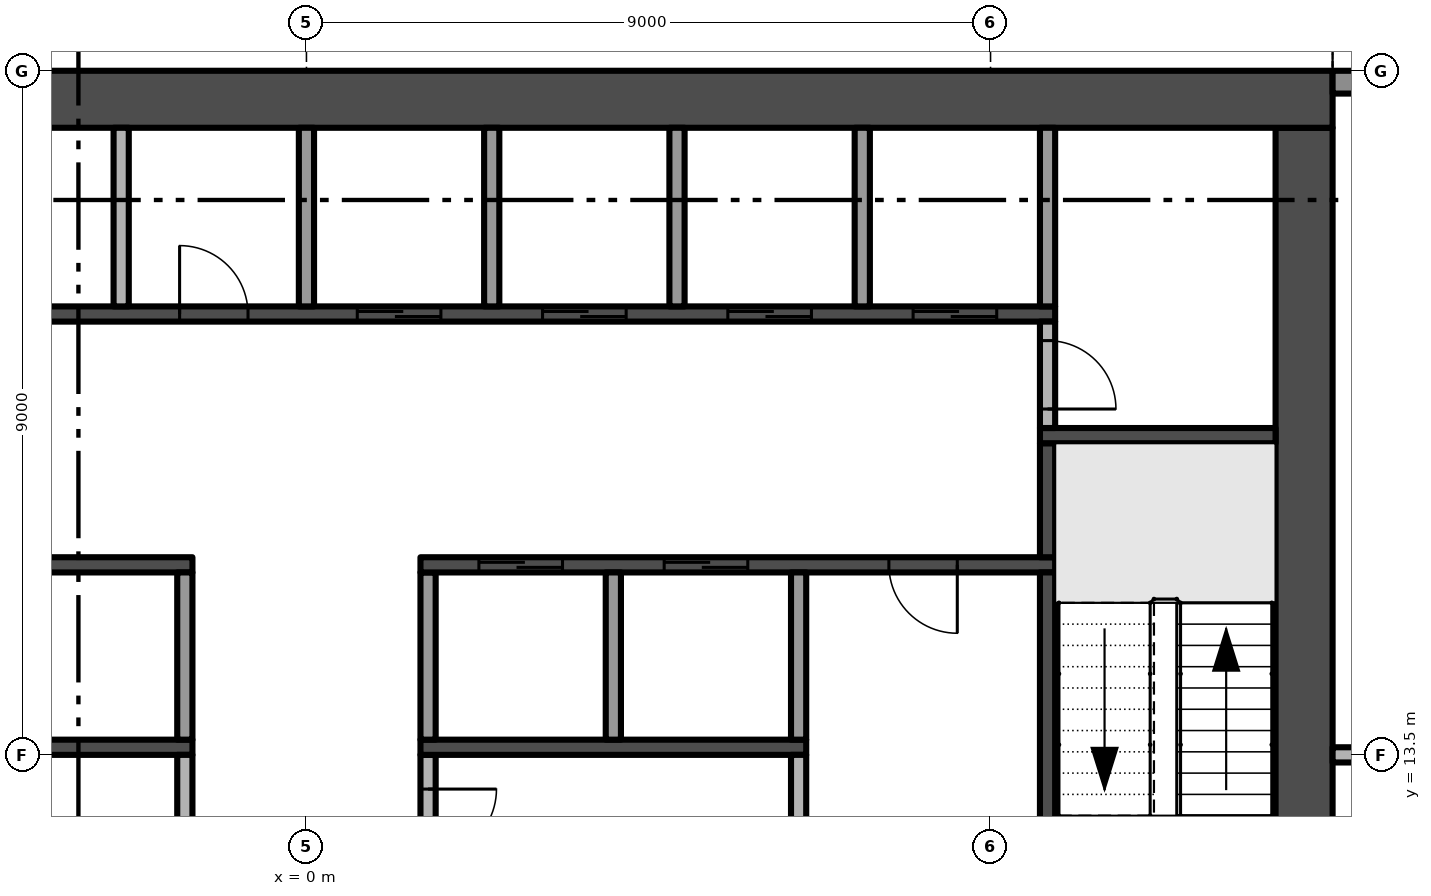
"""IFC4 building model, lengths in metres.
Left out: names, types, materials, properties, quantities, classifications, styles, units other than length and angle.
Written with IfcOpenShell. Run it as: python <this file> out.ifc"""

import sys

from ifc_helpers import new_model, si_unit, direction, frame, frame_2d, origin, place, context, subcontext, project, spatial, rectangle, extrude, element, fill, save


model = new_model("IFC4")
c1 = context("Model", 3, precision=1e-05, world=origin(), true_north=direction((0.0, 1.0)))
c2 = subcontext(c1, "Body", "Model", "MODEL_VIEW")
j1 = project(units=[si_unit("LENGTHUNIT", "METRE"), si_unit("PLANEANGLEUNIT", "RADIAN")], contexts=[c1])
p1 = place(None, origin())
s1 = spatial("IfcSite", under=j1, at=p1, CompositionType="ELEMENT")
p2 = place(p1, origin())
s2 = spatial("IfcBuilding", under=s1, at=p2, CompositionType="ELEMENT")
p3 = place(p2, frame((0.0, 0.0, 151.6)))
s3 = spatial("IfcBuildingStorey", under=s2, at=p3, CompositionType="ELEMENT", Elevation=151.6)
p4 = place(p3, frame((13.125, 5.25, -0.3), z_axis=(0.0, 0.0, 1.0), x_axis=(0.0, 1.0, 0.0)))
e1 = element("IfcWall", 1, at=p4, inside=s3, PredefinedType="SHEAR", context=c2, shape_type="SweptSolid", body=[
    extrude(rectangle(XDim=16.5, YDim=0.75, at=frame_2d((8.25, 0.0))), origin(), (0.0, 0.0, 1.0), 3.8),
])
p5 = place(p4, frame((6.15, 0.0, 0.3)))
e2 = element("IfcOpeningElement", 2, at=p5, cuts=e1, PredefinedType="OPENING", context=c2, shape_type="SweptSolid", body=[
    extrude(rectangle(XDim=1.2, YDim=2.2, at=frame_2d((0.6, 1.1))), frame((0.0, 0.385, 0.0), z_axis=(0.0, -1.0, 0.0), x_axis=(1.0, 0.0, 0.0)), (0.0, 0.0, 1.0), 0.77),
])
p6 = place(p3, frame((13.5, 22.125, -0.3), z_axis=(0.0, 0.0, 1.0), x_axis=(-1.0, 0.0, 0.0)))
e3 = element("IfcWall", 3, at=p6, inside=s3, PredefinedType="SHEAR", context=c2, shape_type="SweptSolid", body=[
    extrude(rectangle(XDim=27.0, YDim=0.75, at=frame_2d((13.5, 0.0))), origin(), (0.0, 0.0, 1.0), 3.8),
])
p7 = place(p3, frame((13.5, 22.35, 0.0), z_axis=(0.0, 0.0, 1.0), x_axis=(1.0, 0.0, 0.0)))
e4 = element("IfcWall", 4, at=p7, inside=s3, PredefinedType="SOLIDWALL", context=c2, shape_type="SweptSolid", body=[
    extrude(rectangle(XDim=3.35, YDim=0.3, at=frame_2d((1.675, 0.0))), origin(), (0.0, 0.0, 1.0), 3.5),
])
p8 = place(p7, frame((0.7, 0.0, 0.0)))
e5 = element("IfcOpeningElement", 5, at=p8, cuts=e4, PredefinedType="OPENING", context=c2, shape_type="SweptSolid", body=[
    extrude(rectangle(XDim=2.35, YDim=2.4, at=frame_2d((1.175, 1.2))), frame((0.0, 0.16, 0.0), z_axis=(0.0, -1.0, 0.0), x_axis=(1.0, 0.0, 0.0)), (0.0, 0.0, 1.0), 0.32),
])
p9 = place(p3, frame((-1.5, 16.0, 0.0), z_axis=(0.0, 0.0, 1.0), x_axis=(-1.0, 0.0, 0.0)))
e6 = element("IfcWall", 6, at=p9, inside=s3, PredefinedType="SHEAR", context=c2, shape_type="SweptSolid", body=[
    extrude(rectangle(XDim=8.35, YDim=0.2, at=frame_2d((4.175, 0.0))), origin(), (0.0, 0.0, 1.0), 3.5),
])
p10 = place(p9, frame((6.162, 0.0, 0.0)))
e7 = element("IfcOpeningElement", 7, at=p10, cuts=e6, PredefinedType="OPENING", context=c2, shape_type="SweptSolid", body=[
    extrude(rectangle(XDim=0.9, YDim=2.1, at=frame_2d((0.45, 1.05))), frame((0.0, 0.11, 0.0), z_axis=(0.0, -1.0, 0.0), x_axis=(1.0, 0.0, 0.0)), (0.0, 0.0, 1.0), 0.22),
])
p11 = place(p3, frame((-9.85, 19.3, 0.0), z_axis=(0.0, 0.0, 1.0), x_axis=(1.0, 0.0, 0.0)))
e8 = element("IfcWall", 8, at=p11, inside=s3, PredefinedType="SHEAR", context=c2, shape_type="SweptSolid", body=[
    extrude(rectangle(XDim=19.7, YDim=0.2, at=frame_2d((9.85, 0.0))), origin(), (0.0, 0.0, 1.0), 3.5),
])
p12 = place(p11, frame((10.519, 0.0, 0.0)))
e9 = element("IfcOpeningElement", 9, at=p12, cuts=e8, PredefinedType="OPENING", context=c2, shape_type="SweptSolid", body=[
    extrude(rectangle(XDim=1.1, YDim=2.1, at=frame_2d((0.55, 1.05))), frame((0.0, 0.11, 0.0), z_axis=(0.0, -1.0, 0.0), x_axis=(1.0, 0.0, 0.0)), (0.0, 0.0, 1.0), 0.22),
])
p13 = place(p11, frame((12.956, 0.0, 0.0)))
e10 = element("IfcOpeningElement", 10, at=p13, cuts=e8, PredefinedType="OPENING", context=c2, shape_type="SweptSolid", body=[
    extrude(rectangle(XDim=1.1, YDim=2.1, at=frame_2d((0.55, 1.05))), frame((0.0, 0.11, 0.0), z_axis=(0.0, -1.0, 0.0), x_axis=(1.0, 0.0, 0.0)), (0.0, 0.0, 1.0), 0.22),
])
p14 = place(p11, frame((15.394, 0.0, 0.0)))
e11 = element("IfcOpeningElement", 11, at=p14, cuts=e8, PredefinedType="OPENING", context=c2, shape_type="SweptSolid", body=[
    extrude(rectangle(XDim=1.1, YDim=2.1, at=frame_2d((0.55, 1.05))), frame((0.0, 0.11, 0.0), z_axis=(0.0, -1.0, 0.0), x_axis=(1.0, 0.0, 0.0)), (0.0, 0.0, 1.0), 0.22),
])
p15 = place(p11, frame((17.831, 0.0, 0.0)))
e12 = element("IfcOpeningElement", 12, at=p15, cuts=e8, PredefinedType="OPENING", context=c2, shape_type="SweptSolid", body=[
    extrude(rectangle(XDim=1.1, YDim=2.1, at=frame_2d((0.55, 1.05))), frame((0.0, 0.11, 0.0), z_axis=(0.0, -1.0, 0.0), x_axis=(1.0, 0.0, 0.0)), (0.0, 0.0, 1.0), 0.22),
])
p16 = place(p11, frame((0.869, 0.0, 0.0)))
e13 = element("IfcOpeningElement", 13, at=p16, cuts=e8, PredefinedType="OPENING", context=c2, shape_type="SweptSolid", body=[
    extrude(rectangle(XDim=0.9, YDim=2.1, at=frame_2d((0.45, 1.05))), frame((0.0, 0.11, 0.0), z_axis=(0.0, -1.0, 0.0), x_axis=(1.0, 0.0, 0.0)), (0.0, 0.0, 1.0), 0.22),
])
p17 = place(p11, frame((4.525, 0.0, 0.0)))
e14 = element("IfcOpeningElement", 14, at=p17, cuts=e8, PredefinedType="OPENING", context=c2, shape_type="SweptSolid", body=[
    extrude(rectangle(XDim=0.9, YDim=2.1, at=frame_2d((0.45, 1.05))), frame((0.0, 0.11, 0.0), z_axis=(0.0, -1.0, 0.0), x_axis=(1.0, 0.0, 0.0)), (0.0, 0.0, 1.0), 0.22),
])
p18 = place(p11, frame((8.181, 0.0, 0.0)))
e15 = element("IfcOpeningElement", 15, at=p18, cuts=e8, PredefinedType="OPENING", context=c2, shape_type="SweptSolid", body=[
    extrude(rectangle(XDim=0.9, YDim=2.1, at=frame_2d((0.45, 1.05))), frame((0.0, 0.11, 0.0), z_axis=(0.0, -1.0, 0.0), x_axis=(1.0, 0.0, 0.0)), (0.0, 0.0, 1.0), 0.22),
])
p19 = place(p3, frame((-6.575, 13.6, 0.0), z_axis=(0.0, 0.0, 1.0), x_axis=(1.0, 0.0, 0.0)))
e16 = element("IfcWall", 16, at=p19, inside=s3, PredefinedType="SHEAR", context=c2, shape_type="SweptSolid", body=[
    extrude(rectangle(XDim=5.075, YDim=0.2, at=frame_2d((2.538, 0.0))), origin(), (0.0, 0.0, 1.0), 3.5),
])
p20 = place(p3, frame((-2.438, 19.4, 0.0), z_axis=(0.0, 0.0, 1.0), x_axis=(0.0, 1.0, 0.0)))
e17 = element("IfcWall", 17, at=p20, inside=s3, PredefinedType="PARTITIONING", context=c2, shape_type="SweptSolid", body=[
    extrude(rectangle(XDim=2.35, YDim=0.2, at=frame_2d((1.175, 0.0))), origin(), (0.0, 0.0, 1.0), 3.5),
])
p21 = place(p3, frame((-1.6, 10.5, 0.0), z_axis=(0.0, 0.0, 1.0), x_axis=(0.0, 1.0, 0.0)))
e18 = element("IfcWall", 18, at=p21, inside=s3, PredefinedType="PARTITIONING", context=c2, shape_type="SweptSolid", body=[
    extrude(rectangle(XDim=3.0, YDim=0.2, at=frame_2d((1.5, 0.0))), origin(), (0.0, 0.0, 1.0), 3.5),
])
p22 = place(p21, frame((1.05, 0.0, 0.0)))
e19 = element("IfcOpeningElement", 19, at=p22, cuts=e18, PredefinedType="OPENING", context=c2, shape_type="SweptSolid", body=[
    extrude(rectangle(XDim=0.9, YDim=2.1, at=frame_2d((0.45, 1.05))), frame((0.0, 0.11, 0.0), z_axis=(0.0, -1.0, 0.0), x_axis=(1.0, 0.0, 0.0)), (0.0, 0.0, 1.0), 0.22),
])
p23 = place(p3, frame((-1.6, 13.7, 0.0), z_axis=(0.0, 0.0, 1.0), x_axis=(0.0, 1.0, 0.0)))
e20 = element("IfcWall", 20, at=p23, inside=s3, PredefinedType="PARTITIONING", context=c2, shape_type="SweptSolid", body=[
    extrude(rectangle(XDim=2.2, YDim=0.2, at=frame_2d((1.1, 0.0))), origin(), (0.0, 0.0, 1.0), 3.5),
])
p24 = place(p3, frame((0.0, 19.4, 0.0), z_axis=(0.0, 0.0, 1.0), x_axis=(0.0, 1.0, 0.0)))
e21 = element("IfcWall", 21, at=p24, inside=s3, PredefinedType="PARTITIONING", context=c2, shape_type="SweptSolid", body=[
    extrude(rectangle(XDim=2.35, YDim=0.2, at=frame_2d((1.175, 0.0))), origin(), (0.0, 0.0, 1.0), 3.5),
])
p25 = place(p3, frame((1.6, 13.5, 0.0), z_axis=(0.0, 0.0, 1.0), x_axis=(0.0, -1.0, 0.0)))
e22 = element("IfcWall", 22, at=p25, inside=s3, PredefinedType="PARTITIONING", context=c2, shape_type="SweptSolid", body=[
    extrude(rectangle(XDim=1.8, YDim=0.2, at=frame_2d((0.9, 0.0))), origin(), (0.0, 0.0, 1.0), 3.5),
])
p26 = place(p25, frame((0.45, 0.0, 0.0)))
e23 = element("IfcOpeningElement", 23, at=p26, cuts=e22, PredefinedType="OPENING", context=c2, shape_type="SweptSolid", body=[
    extrude(rectangle(XDim=0.9, YDim=2.1, at=frame_2d((0.45, 1.05))), frame((0.0, 0.11, 0.0), z_axis=(0.0, -1.0, 0.0), x_axis=(1.0, 0.0, 0.0)), (0.0, 0.0, 1.0), 0.22),
])
p27 = place(p3, frame((1.5, 13.6, 0.0), z_axis=(0.0, 0.0, 1.0), x_axis=(1.0, 0.0, 0.0)))
e24 = element("IfcWall", 24, at=p27, inside=s3, PredefinedType="SHEAR", context=c2, shape_type="SweptSolid", body=[
    extrude(rectangle(XDim=5.075, YDim=0.2, at=frame_2d((2.538, 0.0))), origin(), (0.0, 0.0, 1.0), 3.5),
])
p28 = place(p3, frame((1.6, 13.7, 0.0), z_axis=(0.0, 0.0, 1.0), x_axis=(0.0, 1.0, 0.0)))
e25 = element("IfcWall", 25, at=p28, inside=s3, PredefinedType="PARTITIONING", context=c2, shape_type="SweptSolid", body=[
    extrude(rectangle(XDim=2.2, YDim=0.2, at=frame_2d((1.1, 0.0))), origin(), (0.0, 0.0, 1.0), 3.5),
])
p29 = place(p3, frame((9.85, 16.0, 0.0), z_axis=(0.0, 0.0, 1.0), x_axis=(-1.0, 0.0, 0.0)))
e26 = element("IfcWall", 26, at=p29, inside=s3, PredefinedType="SHEAR", context=c2, shape_type="SweptSolid", body=[
    extrude(rectangle(XDim=8.35, YDim=0.2, at=frame_2d((4.175, 0.0))), origin(), (0.0, 0.0, 1.0), 3.5),
])
p30 = place(p29, frame((6.481, 0.0, 0.0)))
e27 = element("IfcOpeningElement", 27, at=p30, cuts=e26, PredefinedType="OPENING", context=c2, shape_type="SweptSolid", body=[
    extrude(rectangle(XDim=1.1, YDim=2.1, at=frame_2d((0.55, 1.05))), frame((0.0, 0.11, 0.0), z_axis=(0.0, -1.0, 0.0), x_axis=(1.0, 0.0, 0.0)), (0.0, 0.0, 1.0), 0.22),
])
p31 = place(p29, frame((4.044, 0.0, 0.0)))
e28 = element("IfcOpeningElement", 28, at=p31, cuts=e26, PredefinedType="OPENING", context=c2, shape_type="SweptSolid", body=[
    extrude(rectangle(XDim=1.1, YDim=2.1, at=frame_2d((0.55, 1.05))), frame((0.0, 0.11, 0.0), z_axis=(0.0, -1.0, 0.0), x_axis=(1.0, 0.0, 0.0)), (0.0, 0.0, 1.0), 0.22),
])
p32 = place(p29, frame((1.288, 0.0, 0.0)))
e29 = element("IfcOpeningElement", 29, at=p32, cuts=e26, PredefinedType="OPENING", context=c2, shape_type="SweptSolid", body=[
    extrude(rectangle(XDim=0.9, YDim=2.1, at=frame_2d((0.45, 1.05))), frame((0.0, 0.11, 0.0), z_axis=(0.0, -1.0, 0.0), x_axis=(1.0, 0.0, 0.0)), (0.0, 0.0, 1.0), 0.22),
])
p33 = place(p3, frame((2.438, 19.4, 0.0), z_axis=(0.0, 0.0, 1.0), x_axis=(0.0, 1.0, 0.0)))
e30 = element("IfcWall", 30, at=p33, inside=s3, PredefinedType="PARTITIONING", context=c2, shape_type="SweptSolid", body=[
    extrude(rectangle(XDim=2.35, YDim=0.2, at=frame_2d((1.175, 0.0))), origin(), (0.0, 0.0, 1.0), 3.5),
])
p34 = place(p3, frame((4.037, 13.7, 0.0), z_axis=(0.0, 0.0, 1.0), x_axis=(0.0, 1.0, 0.0)))
e31 = element("IfcWall", 31, at=p34, inside=s3, PredefinedType="PARTITIONING", context=c2, shape_type="SweptSolid", body=[
    extrude(rectangle(XDim=2.2, YDim=0.2, at=frame_2d((1.1, 0.0))), origin(), (0.0, 0.0, 1.0), 3.5),
])
p35 = place(p3, frame((4.875, 19.4, 0.0), z_axis=(0.0, 0.0, 1.0), x_axis=(0.0, 1.0, 0.0)))
e32 = element("IfcWall", 32, at=p35, inside=s3, PredefinedType="PARTITIONING", context=c2, shape_type="SweptSolid", body=[
    extrude(rectangle(XDim=2.35, YDim=0.2, at=frame_2d((1.175, 0.0))), origin(), (0.0, 0.0, 1.0), 3.5),
])
p36 = place(p3, frame((6.475, 12.3, 0.0), z_axis=(0.0, 0.0, 1.0), x_axis=(0.0, 1.0, 0.0)))
e33 = element("IfcWall", 33, at=p36, inside=s3, PredefinedType="PARTITIONING", context=c2, shape_type="SweptSolid", body=[
    extrude(rectangle(XDim=1.2, YDim=0.2, at=frame_2d((0.6, 0.0))), origin(), (0.0, 0.0, 1.0), 3.5),
])
p37 = place(p3, frame((6.475, 13.7, 0.0), z_axis=(0.0, 0.0, 1.0), x_axis=(0.0, 1.0, 0.0)))
e34 = element("IfcWall", 34, at=p37, inside=s3, PredefinedType="PARTITIONING", context=c2, shape_type="SweptSolid", body=[
    extrude(rectangle(XDim=2.2, YDim=0.2, at=frame_2d((1.1, 0.0))), origin(), (0.0, 0.0, 1.0), 3.5),
])
p38 = place(p3, frame((7.312, 19.4, 0.0), z_axis=(0.0, 0.0, 1.0), x_axis=(0.0, 1.0, 0.0)))
e35 = element("IfcWall", 35, at=p38, inside=s3, PredefinedType="PARTITIONING", context=c2, shape_type="SweptSolid", body=[
    extrude(rectangle(XDim=2.35, YDim=0.2, at=frame_2d((1.175, 0.0))), origin(), (0.0, 0.0, 1.0), 3.5),
])
p39 = place(p3, frame((9.75, 12.3, 0.0), z_axis=(0.0, 0.0, 1.0), x_axis=(0.0, 1.0, 0.0)))
e36 = element("IfcWall", 36, at=p39, inside=s3, PredefinedType="SHEAR", context=c2, shape_type="SweptSolid", body=[
    extrude(rectangle(XDim=3.6, YDim=0.2, at=frame_2d((1.8, 0.0))), origin(), (0.0, 0.0, 1.0), 3.5),
])
p40 = place(p3, frame((9.75, 16.1, 0.0), z_axis=(0.0, 0.0, 1.0), x_axis=(0.0, 1.0, 0.0)))
e37 = element("IfcWall", 37, at=p40, inside=s3, PredefinedType="SHEAR", context=c2, shape_type="SweptSolid", body=[
    extrude(rectangle(XDim=1.5, YDim=0.2, at=frame_2d((0.75, 0.0))), origin(), (0.0, 0.0, 1.0), 3.5),
])
p41 = place(p3, frame((9.65, 17.7, 0.0), z_axis=(0.0, 0.0, 1.0), x_axis=(1.0, 0.0, 0.0)))
e38 = element("IfcWall", 38, at=p41, inside=s3, PredefinedType="SHEAR", context=c2, shape_type="SweptSolid", body=[
    extrude(rectangle(XDim=3.1, YDim=0.2, at=frame_2d((1.55, 0.0))), origin(), (0.0, 0.0, 1.0), 3.5),
])
p42 = place(p3, frame((9.75, 19.2, 0.0), z_axis=(0.0, 0.0, 1.0), x_axis=(0.0, -1.0, 0.0)))
e39 = element("IfcWall", 39, at=p42, inside=s3, PredefinedType="PARTITIONING", context=c2, shape_type="SweptSolid", body=[
    extrude(rectangle(XDim=1.4, YDim=0.2, at=frame_2d((0.7, 0.0))), origin(), (0.0, 0.0, 1.0), 3.5),
])
p43 = place(p42, frame((0.25, 0.0, 0.0)))
e40 = element("IfcOpeningElement", 40, at=p43, cuts=e39, PredefinedType="OPENING", context=c2, shape_type="SweptSolid", body=[
    extrude(rectangle(XDim=0.9, YDim=2.1, at=frame_2d((0.45, 1.05))), frame((0.0, 0.11, 0.0), z_axis=(0.0, -1.0, 0.0), x_axis=(1.0, 0.0, 0.0)), (0.0, 0.0, 1.0), 0.22),
])
p44 = place(p3, frame((9.75, 19.4, 0.0), z_axis=(0.0, 0.0, 1.0), x_axis=(0.0, 1.0, 0.0)))
e41 = element("IfcWall", 41, at=p44, inside=s3, PredefinedType="PARTITIONING", context=c2, shape_type="SweptSolid", body=[
    extrude(rectangle(XDim=2.35, YDim=0.2, at=frame_2d((1.175, 0.0))), origin(), (0.0, 0.0, 1.0), 3.5),
])
p45 = place(p3, frame((13.5, 13.5, 0.0), z_axis=(0.0, 0.0, 1.0), x_axis=(1.0, 0.0, 0.0)))
e42 = element("IfcWall", 42, at=p45, inside=s3, PredefinedType="PARTITIONING", context=c2, shape_type="SweptSolid", body=[
    extrude(rectangle(XDim=3.875, YDim=0.2, at=frame_2d((1.938, 0.0))), origin(), (0.0, 0.0, 1.0), 3.5),
])
p46 = place(p45, frame((1.6, 0.0, 0.0)))
e43 = element("IfcOpeningElement", 43, at=p46, cuts=e42, PredefinedType="OPENING", context=c2, shape_type="SweptSolid", body=[
    extrude(rectangle(XDim=0.9, YDim=2.1, at=frame_2d((0.45, 1.05))), frame((0.0, 0.11, 0.0), z_axis=(0.0, -1.0, 0.0), x_axis=(1.0, 0.0, 0.0)), (0.0, 0.0, 1.0), 0.22),
])
p47 = place(p12, origin())
e44 = element("IfcDoor", 44, at=p47, inside=s3, OperationType="SLIDING_TO_RIGHT", PredefinedType="DOOR", context=c2, shape_type="SweptSolid", body=[
    extrude(rectangle(XDim=1.1, YDim=2.1, at=frame_2d((0.55, 1.05))), frame((0.0, 0.025, 0.0), z_axis=(0.0, -1.0, 0.0), x_axis=(1.0, 0.0, 0.0)), (0.0, 0.0, 1.0), 0.05),
])
fill(e9, e44)
p48 = place(p13, origin())
e45 = element("IfcDoor", 45, at=p48, inside=s3, OperationType="SLIDING_TO_RIGHT", PredefinedType="DOOR", context=c2, shape_type="SweptSolid", body=[
    extrude(rectangle(XDim=1.1, YDim=2.1, at=frame_2d((0.55, 1.05))), frame((0.0, 0.025, 0.0), z_axis=(0.0, -1.0, 0.0), x_axis=(1.0, 0.0, 0.0)), (0.0, 0.0, 1.0), 0.05),
])
fill(e10, e45)
p49 = place(p14, origin())
e46 = element("IfcDoor", 46, at=p49, inside=s3, OperationType="SLIDING_TO_RIGHT", PredefinedType="DOOR", context=c2, shape_type="SweptSolid", body=[
    extrude(rectangle(XDim=1.1, YDim=2.1, at=frame_2d((0.55, 1.05))), frame((0.0, 0.025, 0.0), z_axis=(0.0, -1.0, 0.0), x_axis=(1.0, 0.0, 0.0)), (0.0, 0.0, 1.0), 0.05),
])
fill(e11, e46)
p50 = place(p15, origin())
e47 = element("IfcDoor", 47, at=p50, inside=s3, OperationType="SLIDING_TO_RIGHT", PredefinedType="DOOR", context=c2, shape_type="SweptSolid", body=[
    extrude(rectangle(XDim=1.1, YDim=2.1, at=frame_2d((0.55, 1.05))), frame((0.0, 0.025, 0.0), z_axis=(0.0, -1.0, 0.0), x_axis=(1.0, 0.0, 0.0)), (0.0, 0.0, 1.0), 0.05),
])
fill(e12, e47)
p51 = place(p30, origin())
e48 = element("IfcDoor", 48, at=p51, inside=s3, OperationType="SLIDING_TO_RIGHT", PredefinedType="DOOR", context=c2, shape_type="SweptSolid", body=[
    extrude(rectangle(XDim=1.1, YDim=2.1, at=frame_2d((0.55, 1.05))), frame((0.0, 0.025, 0.0), z_axis=(0.0, -1.0, 0.0), x_axis=(1.0, 0.0, 0.0)), (0.0, 0.0, 1.0), 0.05),
])
fill(e27, e48)
p52 = place(p31, origin())
e49 = element("IfcDoor", 49, at=p52, inside=s3, OperationType="SLIDING_TO_RIGHT", PredefinedType="DOOR", context=c2, shape_type="SweptSolid", body=[
    extrude(rectangle(XDim=1.1, YDim=2.1, at=frame_2d((0.55, 1.05))), frame((0.0, 0.025, 0.0), z_axis=(0.0, -1.0, 0.0), x_axis=(1.0, 0.0, 0.0)), (0.0, 0.0, 1.0), 0.05),
])
fill(e28, e49)
p53 = place(p26, origin())
e50 = element("IfcDoor", 50, at=p53, inside=s3, OperationType="SINGLE_SWING_LEFT", PredefinedType="DOOR", context=c2, shape_type="SweptSolid", body=[
    extrude(rectangle(XDim=0.9, YDim=2.1, at=frame_2d((0.45, 1.05))), frame((0.0, 0.025, 0.0), z_axis=(0.0, -1.0, 0.0), x_axis=(1.0, 0.0, 0.0)), (0.0, 0.0, 1.0), 0.05),
])
fill(e23, e50)
p54 = place(p32, origin())
e51 = element("IfcDoor", 51, at=p54, inside=s3, OperationType="SINGLE_SWING_LEFT", PredefinedType="DOOR", context=c2, shape_type="SweptSolid", body=[
    extrude(rectangle(XDim=0.9, YDim=2.1, at=frame_2d((0.45, 1.05))), frame((0.0, 0.025, 0.0), z_axis=(0.0, -1.0, 0.0), x_axis=(1.0, 0.0, 0.0)), (0.0, 0.0, 1.0), 0.05),
])
fill(e29, e51)
p55 = place(p43, origin())
e52 = element("IfcDoor", 52, at=p55, inside=s3, OperationType="SINGLE_SWING_RIGHT", PredefinedType="DOOR", context=c2, shape_type="SweptSolid", body=[
    extrude(rectangle(XDim=0.9, YDim=2.1, at=frame_2d((0.45, 1.05))), frame((0.0, 0.025, 0.0), z_axis=(0.0, -1.0, 0.0), x_axis=(1.0, 0.0, 0.0)), (0.0, 0.0, 1.0), 0.05),
])
fill(e40, e52)
p56 = place(p18, origin())
e53 = element("IfcDoor", 53, at=p56, inside=s3, OperationType="SINGLE_SWING_LEFT", PredefinedType="DOOR", context=c2, shape_type="SweptSolid", body=[
    extrude(rectangle(XDim=0.9, YDim=2.1, at=frame_2d((0.45, 1.05))), frame((0.0, 0.025, 0.0), z_axis=(0.0, -1.0, 0.0), x_axis=(1.0, 0.0, 0.0)), (0.0, 0.0, 1.0), 0.05),
])
fill(e15, e53)
save(model, sys.argv[1])
